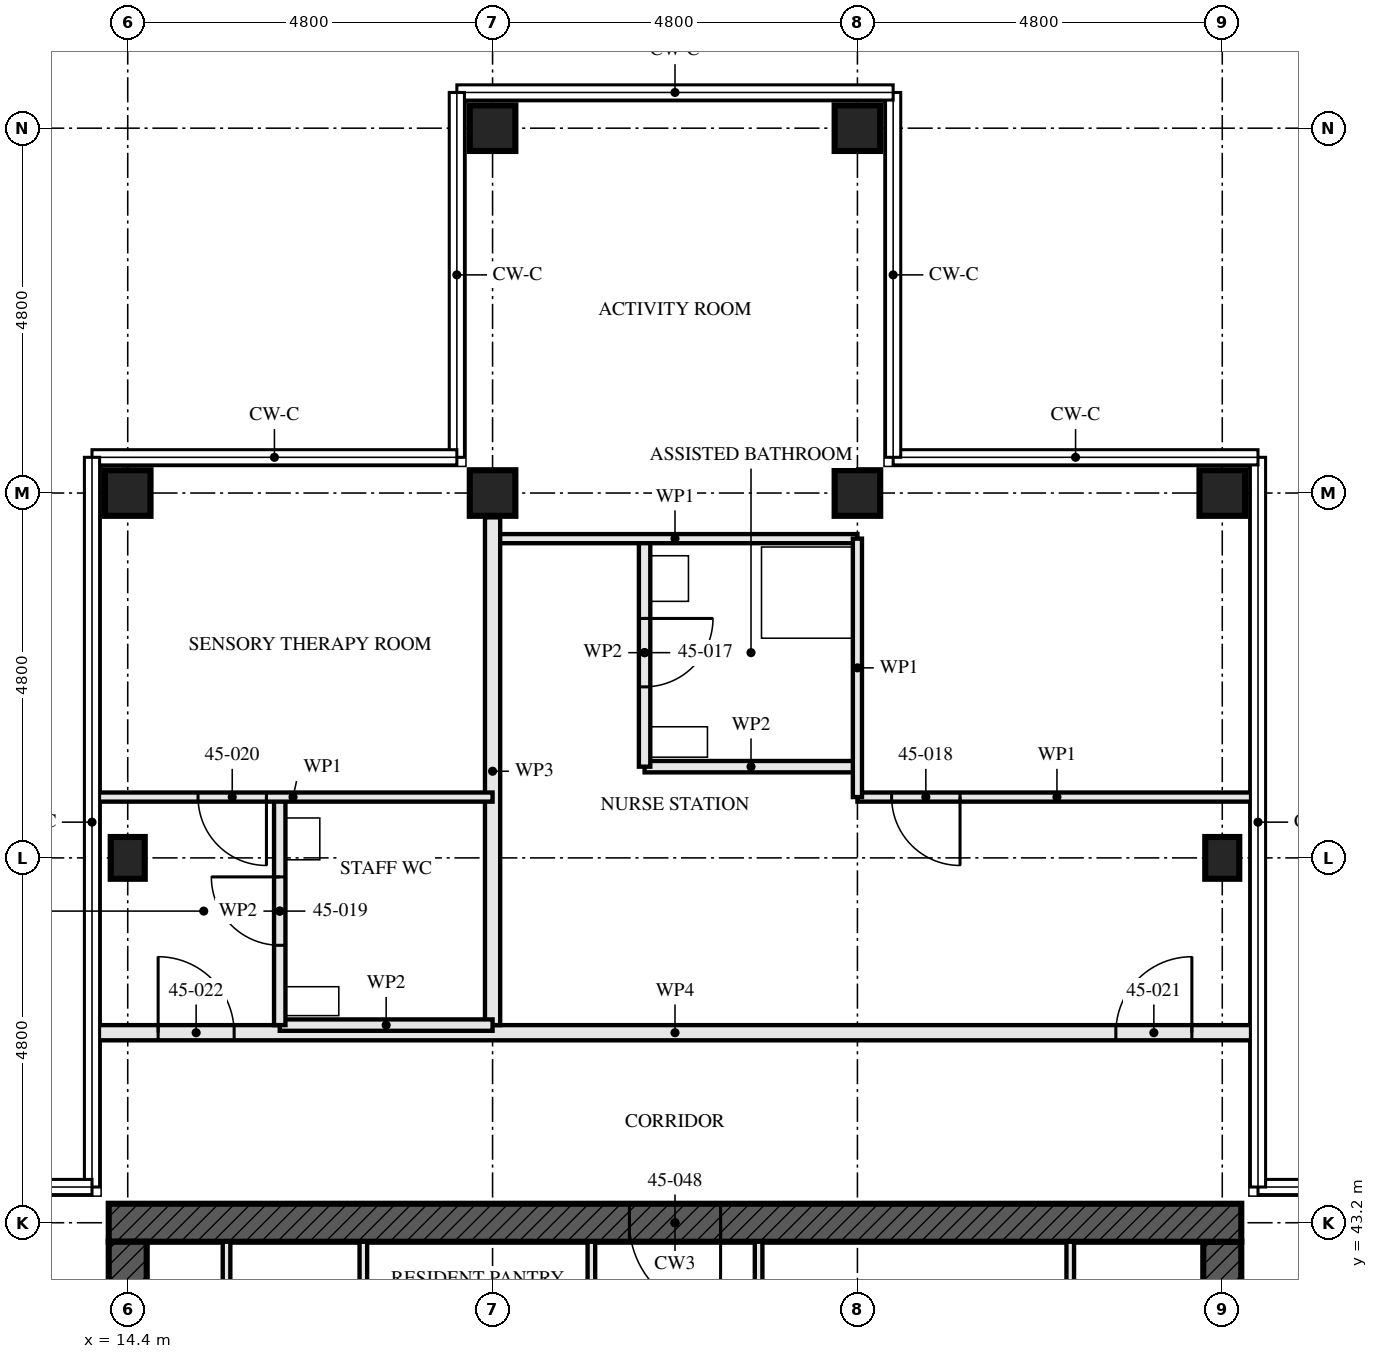
"""IFC4 building model, lengths in metres.
Left out: names, types, materials, properties, quantities, classifications, styles, units other than length and angle.
Written with IfcOpenShell. Run it as: python <this file> out.ifc"""

import sys

from ifc_helpers import new_model, si_unit, direction, frame, frame_2d, origin, origin_2d, place, context, subcontext, project, spatial, rectangle, hollow_rectangle, i_section, extrude, element, fill, save


model = new_model("IFC4")
c1 = context("Model", 3, precision=1e-05, world=origin(), true_north=direction((0.0, 1.0)))
c2 = subcontext(c1, "Body", "Model", "MODEL_VIEW")
j1 = project(units=[si_unit("LENGTHUNIT", "METRE"), si_unit("PLANEANGLEUNIT", "RADIAN")], contexts=[c1])
p1 = place(None, origin())
s1 = spatial("IfcSite", under=j1, at=p1, CompositionType="ELEMENT")
p2 = place(p1, origin())
s2 = spatial("IfcBuilding", under=s1, at=p2, CompositionType="ELEMENT")
p3 = place(p2, frame((0.0, 0.0, 165.5)))
s3 = spatial("IfcBuildingStorey", under=s2, at=p3, CompositionType="ELEMENT", Elevation=165.5)
p4 = place(p3, frame((14.4, 48.0, 0.0), z_axis=(0.0, 0.0, 1.0), x_axis=(1.0, 0.0, 0.0)))
e1 = element("IfcColumn", 1, at=p4, inside=s3, PredefinedType="COLUMN", context=c2, shape_type="SweptSolid", body=[
    extrude(i_section(OverallWidth=0.448, OverallDepth=0.55, WebThickness=0.072, FlangeThickness=0.115, FilletRadius=0.015, at=origin_2d()), origin(), (0.0, 0.0, 1.0), 3.5),
])
for number, where, z_axis, x_axis in (
    (2, (14.4, 52.8, 0.0), (0.0, 0.0, 1.0), (0.0, 1.0, 0.0)),
    (3, (19.2, 52.8, 0.0), (0.0, 0.0, 1.0), (0.0, 1.0, 0.0)),
    (4, (19.2, 57.6, 0.0), (0.0, 0.0, 1.0), (0.0, 1.0, 0.0)),
    (5, (24.0, 52.8, 0.0), (0.0, 0.0, 1.0), (0.0, 1.0, 0.0)),
    (6, (24.0, 57.6, 0.0), (0.0, 0.0, 1.0), (0.0, 1.0, 0.0)),
):
    element("IfcColumn", number, at=place(p3, frame(where, z_axis=z_axis, x_axis=x_axis)), inside=s3, PredefinedType="COLUMN", context=c2, shape_type="SweptSolid", body=[
        extrude(hollow_rectangle(XDim=0.6, YDim=0.6, WallThickness=0.05, at=origin_2d()), origin(), (0.0, 0.0, 1.0), 3.5),
    ])
p5 = place(p3, frame((28.8, 48.0, 0.0), z_axis=(0.0, 0.0, 1.0), x_axis=(1.0, 0.0, 0.0)))
e7 = element("IfcColumn", 7, at=p5, inside=s3, PredefinedType="COLUMN", context=c2, shape_type="SweptSolid", body=[
    extrude(i_section(OverallWidth=0.448, OverallDepth=0.55, WebThickness=0.072, FlangeThickness=0.115, FilletRadius=0.015, at=origin_2d()), origin(), (0.0, 0.0, 1.0), 3.5),
])
p6 = place(p3, frame((28.8, 52.8, 0.0), z_axis=(0.0, 0.0, 1.0), x_axis=(0.0, 1.0, 0.0)))
e8 = element("IfcColumn", 8, at=p6, inside=s3, PredefinedType="COLUMN", context=c2, shape_type="SweptSolid", body=[
    extrude(hollow_rectangle(XDim=0.6, YDim=0.6, WallThickness=0.05, at=origin_2d()), origin(), (0.0, 0.0, 1.0), 3.5),
])
p7 = place(p3, frame((29.05, 43.2, -0.17), z_axis=(0.0, 0.0, 1.0), x_axis=(-1.0, 0.0, 0.0)))
e9 = element("IfcWall", 9, at=p7, inside=s3, PredefinedType="SHEAR", context=c2, shape_type="SweptSolid", body=[
    extrude(rectangle(XDim=14.9, YDim=0.5, at=frame_2d((7.45, 0.0))), origin(), (0.0, 0.0, 1.0), 3.5),
])
p8 = place(p7, frame((6.85, 0.0, 0.17)))
e10 = element("IfcOpeningElement", 10, at=p8, cuts=e9, PredefinedType="OPENING", context=c2, shape_type="SweptSolid", body=[
    extrude(rectangle(XDim=1.2, YDim=2.1, at=frame_2d((0.6, 1.05))), frame((0.0, 0.26, 0.0), z_axis=(0.0, -1.0, 0.0), x_axis=(1.0, 0.0, 0.0)), (0.0, 0.0, 1.0), 0.521),
])
p9 = place(p3, frame((14.4, 42.95, -0.17), z_axis=(0.0, 0.0, 1.0), x_axis=(0.0, -1.0, 0.0)))
e11 = element("IfcWall", 11, at=p9, inside=s3, PredefinedType="SHEAR", context=c2, shape_type="SweptSolid", body=[
    extrude(rectangle(XDim=13.9, YDim=0.5, at=frame_2d((6.95, 0.0))), origin(), (0.0, 0.0, 1.0), 3.5),
])
p10 = place(p9, frame((6.35, 0.0, 0.17)))
e12 = element("IfcOpeningElement", 12, at=p10, cuts=e11, PredefinedType="OPENING", context=c2, shape_type="SweptSolid", body=[
    extrude(rectangle(XDim=1.2, YDim=2.1, at=frame_2d((0.6, 1.05))), frame((0.0, 0.26, 0.0), z_axis=(0.0, -1.0, 0.0), x_axis=(1.0, 0.0, 0.0)), (0.0, 0.0, 1.0), 0.521),
])
p11 = place(p3, frame((28.8, 29.05, -0.17), z_axis=(0.0, 0.0, 1.0), x_axis=(0.0, 1.0, 0.0)))
e13 = element("IfcWall", 13, at=p11, inside=s3, PredefinedType="SHEAR", context=c2, shape_type="SweptSolid", body=[
    extrude(rectangle(XDim=13.9, YDim=0.5, at=frame_2d((6.95, 0.0))), origin(), (0.0, 0.0, 1.0), 3.5),
])
p12 = place(p11, frame((6.35, 0.0, 0.17)))
e14 = element("IfcOpeningElement", 14, at=p12, cuts=e13, PredefinedType="OPENING", context=c2, shape_type="SweptSolid", body=[
    extrude(rectangle(XDim=1.2, YDim=2.1, at=frame_2d((0.6, 1.05))), frame((0.0, 0.26, 0.0), z_axis=(0.0, -1.0, 0.0), x_axis=(1.0, 0.0, 0.0)), (0.0, 0.0, 1.0), 0.521),
])
p13 = place(p3, frame((21.2, 52.2, 0.0), z_axis=(0.0, 0.0, 1.0), x_axis=(0.0, -1.0, 0.0)))
e15 = element("IfcWall", 15, at=p13, inside=s3, PredefinedType="PARTITIONING", context=c2, shape_type="SweptSolid", body=[
    extrude(rectangle(XDim=3.0, YDim=0.15, at=frame_2d((1.5, 0.0))), origin(), (0.0, 0.0, 1.0), 3.33),
])
p14 = place(p13, frame((1.05, 0.0, 0.0)))
e16 = element("IfcOpeningElement", 16, at=p14, cuts=e15, PredefinedType="OPENING", context=c2, shape_type="SweptSolid", body=[
    extrude(rectangle(XDim=0.9, YDim=2.1, at=frame_2d((0.45, 1.05))), frame((0.0, 0.085, 0.0), z_axis=(0.0, -1.0, 0.0), x_axis=(1.0, 0.0, 0.0)), (0.0, 0.0, 1.0), 0.171),
])
p15 = place(p3, frame((24.0, 49.2, 0.0), z_axis=(0.0, 0.0, 1.0), x_axis=(-1.0, 0.0, 0.0)))
e17 = element("IfcWall", 17, at=p15, inside=s3, PredefinedType="PARTITIONING", context=c2, shape_type="SweptSolid", body=[
    extrude(rectangle(XDim=2.8, YDim=0.15, at=frame_2d((1.4, 0.0))), origin(), (0.0, 0.0, 1.0), 3.33),
])
p16 = place(p3, frame((29.25, 48.8, 0.0), z_axis=(0.0, 0.0, 1.0), x_axis=(-1.0, 0.0, 0.0)))
e18 = element("IfcWall", 18, at=p16, inside=s3, PredefinedType="PARTITIONING", context=c2, shape_type="SweptSolid", body=[
    extrude(rectangle(XDim=5.25, YDim=0.12, at=frame_2d((2.625, 0.0))), origin(), (0.0, 0.0, 1.0), 2.32),
])
p17 = place(p16, frame((3.9, 0.0, 0.0)))
e19 = element("IfcOpeningElement", 19, at=p17, cuts=e18, PredefinedType="OPENING", context=c2, shape_type="SweptSolid", body=[
    extrude(rectangle(XDim=0.9, YDim=2.1, at=frame_2d((0.45, 1.05))), frame((0.0, 0.071, 0.0), z_axis=(0.0, -1.0, 0.0), x_axis=(1.0, 0.0, 0.0)), (0.0, 0.0, 1.0), 0.141),
])
p18 = place(p3, frame((24.0, 52.2, 0.0), z_axis=(0.0, 0.0, 1.0), x_axis=(-1.0, 0.0, 0.0)))
e20 = element("IfcWall", 20, at=p18, inside=s3, PredefinedType="PARTITIONING", context=c2, shape_type="SweptSolid", body=[
    extrude(rectangle(XDim=4.8, YDim=0.12, at=frame_2d((2.4, 0.0))), origin(), (0.0, 0.0, 1.0), 3.33),
])
p19 = place(p3, frame((24.0, 52.2, 0.0), z_axis=(0.0, 0.0, 1.0), x_axis=(0.0, -1.0, 0.0)))
e21 = element("IfcWall", 21, at=p19, inside=s3, PredefinedType="PARTITIONING", context=c2, shape_type="SweptSolid", body=[
    extrude(rectangle(XDim=3.4, YDim=0.12, at=frame_2d((1.7, 0.0))), origin(), (0.0, 0.0, 1.0), 3.33),
])
p20 = place(p3, frame((19.2, 52.48, 0.0), z_axis=(0.0, 0.0, 1.0), x_axis=(0.0, -1.0, 0.0)))
e22 = element("IfcWall", 22, at=p20, inside=s3, PredefinedType="PARTITIONING", context=c2, shape_type="SweptSolid", body=[
    extrude(rectangle(XDim=6.68, YDim=0.2, at=frame_2d((3.34, 0.0))), origin(), (0.0, 0.0, 1.0), 2.55),
])
p21 = place(p3, frame((16.4, 48.8, 0.0), z_axis=(0.0, 0.0, 1.0), x_axis=(0.0, -1.0, 0.0)))
e23 = element("IfcWall", 23, at=p21, inside=s3, PredefinedType="PARTITIONING", context=c2, shape_type="SweptSolid", body=[
    extrude(rectangle(XDim=3.0, YDim=0.15, at=frame_2d((1.5, 0.0))), origin(), (0.0, 0.0, 1.0), 2.55),
])
p22 = place(p21, frame((1.05, 0.0, 0.0)))
e24 = element("IfcOpeningElement", 24, at=p22, cuts=e23, PredefinedType="OPENING", context=c2, shape_type="SweptSolid", body=[
    extrude(rectangle(XDim=0.9, YDim=2.1, at=frame_2d((0.45, 1.05))), frame((0.0, 0.085, 0.0), z_axis=(0.0, -1.0, 0.0), x_axis=(1.0, 0.0, 0.0)), (0.0, 0.0, 1.0), 0.171),
])
p23 = place(p3, frame((19.2, 45.8, 0.0), z_axis=(0.0, 0.0, 1.0), x_axis=(-1.0, 0.0, 0.0)))
e25 = element("IfcWall", 25, at=p23, inside=s3, PredefinedType="PARTITIONING", context=c2, shape_type="SweptSolid", body=[
    extrude(rectangle(XDim=2.8, YDim=0.15, at=frame_2d((1.4, 0.0))), origin(), (0.0, 0.0, 1.0), 3.33),
])
p24 = place(p3, frame((19.2, 48.8, 0.0), z_axis=(0.0, 0.0, 1.0), x_axis=(-1.0, 0.0, 0.0)))
e26 = element("IfcWall", 26, at=p24, inside=s3, PredefinedType="PARTITIONING", context=c2, shape_type="SweptSolid", body=[
    extrude(rectangle(XDim=5.25, YDim=0.12, at=frame_2d((2.625, 0.0))), origin(), (0.0, 0.0, 1.0), 2.32),
])
p25 = place(p24, frame((2.975, 0.0, 0.0)))
e27 = element("IfcOpeningElement", 27, at=p25, cuts=e26, PredefinedType="OPENING", context=c2, shape_type="SweptSolid", body=[
    extrude(rectangle(XDim=0.9, YDim=2.1, at=frame_2d((0.45, 1.05))), frame((0.0, 0.071, 0.0), z_axis=(0.0, -1.0, 0.0), x_axis=(1.0, 0.0, 0.0)), (0.0, 0.0, 1.0), 0.141),
])
p26 = place(p3, frame((29.25, 45.7, 0.0), z_axis=(0.0, 0.0, 1.0), x_axis=(-1.0, 0.0, 0.0)))
e28 = element("IfcWall", 28, at=p26, inside=s3, PredefinedType="PARTITIONING", context=c2, shape_type="SweptSolid", body=[
    extrude(rectangle(XDim=15.3, YDim=0.2, at=frame_2d((7.65, 0.0))), origin(), (0.0, 0.0, 1.0), 2.32),
])
p27 = place(p26, frame((0.85, 0.0, 0.0)))
e29 = element("IfcOpeningElement", 29, at=p27, cuts=e28, PredefinedType="OPENING", context=c2, shape_type="SweptSolid", body=[
    extrude(rectangle(XDim=1.0, YDim=2.1, at=frame_2d((0.5, 1.05))), frame((0.0, 0.111, 0.0), z_axis=(0.0, -1.0, 0.0), x_axis=(1.0, 0.0, 0.0)), (0.0, 0.0, 1.0), 0.221),
])
p28 = place(p26, frame((13.45, 0.0, 0.0)))
e30 = element("IfcOpeningElement", 30, at=p28, cuts=e28, PredefinedType="OPENING", context=c2, shape_type="SweptSolid", body=[
    extrude(rectangle(XDim=1.0, YDim=2.1, at=frame_2d((0.5, 1.05))), frame((0.0, 0.111, 0.0), z_axis=(0.0, -1.0, 0.0), x_axis=(1.0, 0.0, 0.0)), (0.0, 0.0, 1.0), 0.221),
])
for number, where, z_axis, x_axis in (
    (31, (15.7, 37.15, 0.0), (0.0, 0.0, 1.0), (0.0, 1.0, 0.0)),
    (32, (26.8, 37.15, 0.0), (0.0, 0.0, 1.0), (0.0, 1.0, 0.0)),
):
    element("IfcWall", number, at=place(p3, frame(where, z_axis=z_axis, x_axis=x_axis)), inside=s3, PredefinedType="SOLIDWALL", context=c2, shape_type="SweptSolid", body=[
        extrude(rectangle(XDim=5.8, YDim=0.1, at=frame_2d((2.9, 0.0))), origin(), (0.0, 0.0, 1.0), 3.33),
    ])
p29 = place(p3, frame((20.5, 37.15, 0.0), z_axis=(0.0, 0.0, 1.0), x_axis=(0.0, 1.0, 0.0)))
e33 = element("IfcWall", 33, at=p29, inside=s3, PredefinedType="SOLIDWALL", context=c2, shape_type="SweptSolid", body=[
    extrude(rectangle(XDim=5.8, YDim=0.1, at=frame_2d((2.9, 0.0))), origin(), (0.0, 0.0, 1.0), 3.33),
])
p30 = place(p29, frame((0.975, 0.0, 0.0)))
e34 = element("IfcOpeningElement", 34, at=p30, cuts=e33, PredefinedType="OPENING", context=c2, shape_type="SweptSolid", body=[
    extrude(rectangle(XDim=0.9, YDim=2.1, at=frame_2d((0.45, 1.05))), frame((0.0, 0.061, 0.0), z_axis=(0.0, -1.0, 0.0), x_axis=(1.0, 0.0, 0.0)), (0.0, 0.0, 1.0), 0.121),
])
p31 = place(p3, frame((22.7, 37.15, 0.0), z_axis=(0.0, 0.0, 1.0), x_axis=(0.0, 1.0, 0.0)))
e35 = element("IfcWall", 35, at=p31, inside=s3, PredefinedType="SOLIDWALL", context=c2, shape_type="SweptSolid", body=[
    extrude(rectangle(XDim=5.8, YDim=0.1, at=frame_2d((2.9, 0.0))), origin(), (0.0, 0.0, 1.0), 3.33),
])
p32 = place(p31, frame((0.925, 0.0, 0.0)))
e36 = element("IfcOpeningElement", 36, at=p32, cuts=e35, PredefinedType="OPENING", context=c2, shape_type="SweptSolid", body=[
    extrude(rectangle(XDim=1.0, YDim=2.1, at=frame_2d((0.5, 1.05))), frame((0.0, 0.061, 0.0), z_axis=(0.0, -1.0, 0.0), x_axis=(1.0, 0.0, 0.0)), (0.0, 0.0, 1.0), 0.121),
])
p33 = place(p3, frame((17.5, 37.15, 0.0), z_axis=(0.0, 0.0, 1.0), x_axis=(0.0, 1.0, 0.0)))
e37 = element("IfcWall", 37, at=p33, inside=s3, PredefinedType="SOLIDWALL", context=c2, shape_type="SweptSolid", body=[
    extrude(rectangle(XDim=5.8, YDim=0.1, at=frame_2d((2.9, 0.0))), origin(), (0.0, 0.0, 1.0), 3.33),
])
p34 = place(p14, origin())
e38 = element("IfcDoor", 38, at=p34, inside=s3, OperationType="SINGLE_SWING_RIGHT", PredefinedType="DOOR", context=c2, shape_type="SweptSolid", body=[
    extrude(rectangle(XDim=0.9, YDim=2.1, at=frame_2d((0.45, 1.05))), frame((0.0, 0.022, 0.0), z_axis=(0.0, -1.0, 0.0), x_axis=(1.0, 0.0, 0.0)), (0.0, 0.0, 1.0), 0.044),
])
fill(e16, e38)
p35 = place(p17, origin())
e39 = element("IfcDoor", 39, at=p35, inside=s3, OperationType="SINGLE_SWING_RIGHT", PredefinedType="DOOR", context=c2, shape_type="SweptSolid", body=[
    extrude(rectangle(XDim=0.9, YDim=2.1, at=frame_2d((0.45, 1.05))), frame((0.0, 0.022, 0.0), z_axis=(0.0, -1.0, 0.0), x_axis=(1.0, 0.0, 0.0)), (0.0, 0.0, 1.0), 0.044),
])
fill(e19, e39)
p36 = place(p22, frame((0.9, 0.0, 0.0), z_axis=(0.0, 0.0, 1.0), x_axis=(-1.0, 0.0, 0.0)))
e40 = element("IfcDoor", 40, at=p36, inside=s3, OperationType="SINGLE_SWING_LEFT", PredefinedType="DOOR", context=c2, shape_type="SweptSolid", body=[
    extrude(rectangle(XDim=0.9, YDim=2.1, at=frame_2d((0.45, 1.05))), frame((0.0, 0.022, 0.0), z_axis=(0.0, -1.0, 0.0), x_axis=(1.0, 0.0, 0.0)), (0.0, 0.0, 1.0), 0.044),
])
fill(e24, e40)
p37 = place(p25, origin())
e41 = element("IfcDoor", 41, at=p37, inside=s3, OperationType="SINGLE_SWING_RIGHT", PredefinedType="DOOR", context=c2, shape_type="SweptSolid", body=[
    extrude(rectangle(XDim=0.9, YDim=2.1, at=frame_2d((0.45, 1.05))), frame((0.0, 0.022, 0.0), z_axis=(0.0, -1.0, 0.0), x_axis=(1.0, 0.0, 0.0)), (0.0, 0.0, 1.0), 0.044),
])
fill(e27, e41)
p38 = place(p27, frame((1.0, 0.0, 0.0), z_axis=(0.0, 0.0, 1.0), x_axis=(-1.0, 0.0, 0.0)))
e42 = element("IfcDoor", 42, at=p38, inside=s3, OperationType="SINGLE_SWING_LEFT", PredefinedType="DOOR", context=c2, shape_type="SweptSolid", body=[
    extrude(rectangle(XDim=1.0, YDim=2.1, at=frame_2d((0.5, 1.05))), frame((0.0, 0.027, 0.0), z_axis=(0.0, -1.0, 0.0), x_axis=(1.0, 0.0, 0.0)), (0.0, 0.0, 1.0), 0.054),
])
fill(e29, e42)
p39 = place(p28, frame((1.0, 0.0, 0.0), z_axis=(0.0, 0.0, 1.0), x_axis=(-1.0, 0.0, 0.0)))
e43 = element("IfcDoor", 43, at=p39, inside=s3, OperationType="SINGLE_SWING_RIGHT", PredefinedType="DOOR", context=c2, shape_type="SweptSolid", body=[
    extrude(rectangle(XDim=1.0, YDim=2.1, at=frame_2d((0.5, 1.05))), frame((0.0, 0.027, 0.0), z_axis=(0.0, -1.0, 0.0), x_axis=(1.0, 0.0, 0.0)), (0.0, 0.0, 1.0), 0.054),
])
fill(e30, e43)
p40 = place(p8, origin())
e44 = element("IfcDoor", 44, at=p40, inside=s3, OperationType="SINGLE_SWING_LEFT", PredefinedType="DOOR", context=c2, shape_type="SweptSolid", body=[
    extrude(rectangle(XDim=1.2, YDim=2.1, at=frame_2d((0.6, 1.05))), frame((0.0, 0.027, 0.0), z_axis=(0.0, -1.0, 0.0), x_axis=(1.0, 0.0, 0.0)), (0.0, 0.0, 1.0), 0.054),
])
fill(e10, e44)
save(model, sys.argv[1])
